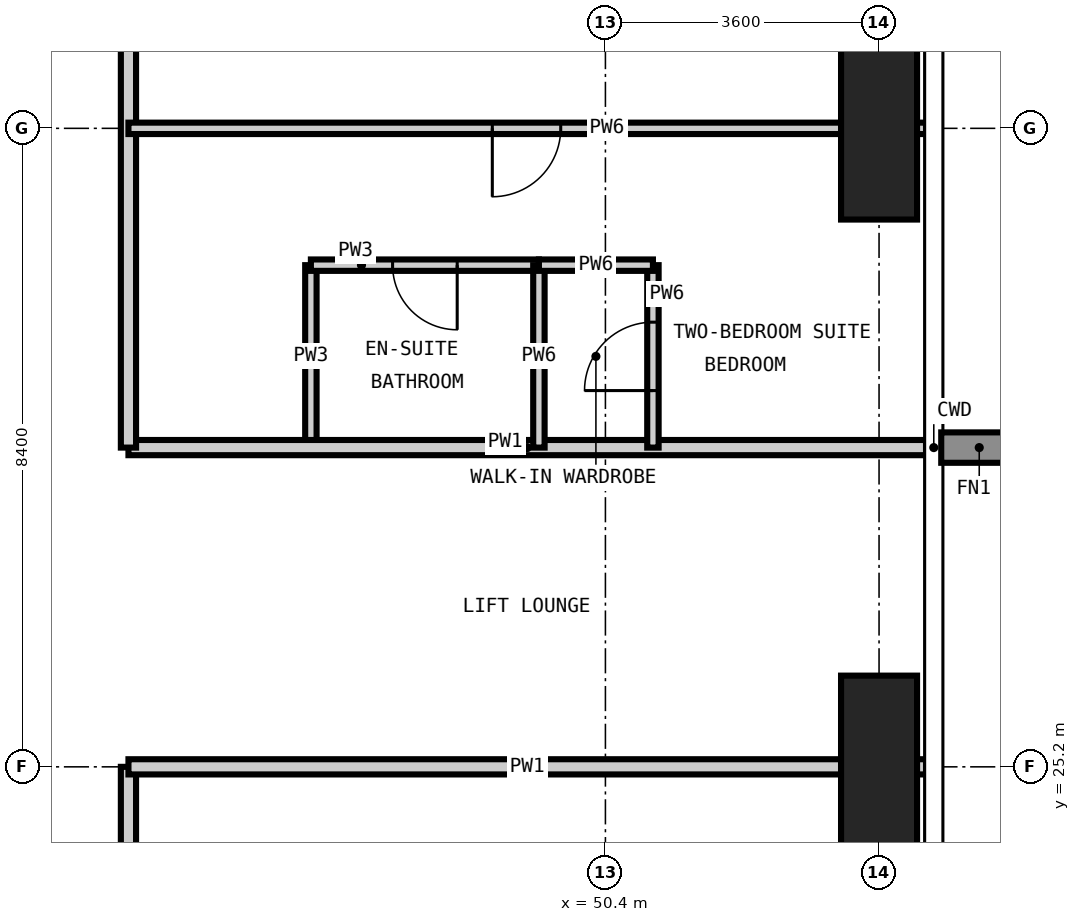
"""IFC4 building model, lengths in metres.
Left out: names, types, materials, properties, quantities, classifications, styles, units other than length and angle.
Written with IfcOpenShell. Run it as: python <this file> out.ifc"""

import sys

from ifc_helpers import new_model, si_unit, direction, frame, frame_2d, origin, origin_2d, place, context, subcontext, project, spatial, rectangle, extrude, element, fill, save


model = new_model("IFC4")
c1 = context("Model", 3, precision=1e-05, world=origin(), true_north=direction((0.0, 1.0)))
c2 = subcontext(c1, "Body", "Model", "MODEL_VIEW")
j1 = project(units=[si_unit("LENGTHUNIT", "METRE"), si_unit("PLANEANGLEUNIT", "RADIAN")], contexts=[c1])
p1 = place(None, origin())
s1 = spatial("IfcSite", under=j1, at=p1, CompositionType="ELEMENT")
p2 = place(p1, origin())
s2 = spatial("IfcBuilding", under=s1, at=p2, CompositionType="ELEMENT")
p3 = place(p2, frame((0.0, 0.0, 276.3)))
s3 = spatial("IfcBuildingStorey", under=s2, at=p3, CompositionType="ELEMENT", Elevation=276.3)
for number, where, z_axis, x_axis in (
    (1, (54.0, 25.2, -0.35), (0.0, 0.0, 1.0), (1.0, 0.0, 0.0)),
    (2, (54.0, 33.6, -0.35), (0.0, 0.0, 1.0), (1.0, 0.0, 0.0)),
):
    element("IfcColumn", number, at=place(p3, frame(where, z_axis=z_axis, x_axis=x_axis)), inside=s3, PredefinedType="COLUMN", context=c2, shape_type="SweptSolid", body=[
        extrude(rectangle(XDim=1.0, YDim=2.4, at=origin_2d()), origin(), (0.0, 0.0, 1.0), 3.9),
    ])
p4 = place(p3, frame((46.525, 29.4, 0.0), z_axis=(0.0, 0.0, 1.0), x_axis=(0.0, 1.0, 0.0)))
e3 = element("IfcWall", 3, at=p4, inside=s3, PredefinedType="PARTITIONING", context=c2, shape_type="SweptSolid", body=[
    extrude(rectangle(XDim=2.4, YDim=0.15, at=frame_2d((1.2, 0.0))), origin(), (0.0, 0.0, 1.0), 3.55),
])
p5 = place(p3, frame((46.525, 31.8, 0.0), z_axis=(0.0, 0.0, 1.0), x_axis=(1.0, 0.0, 0.0)))
e4 = element("IfcWall", 4, at=p5, inside=s3, PredefinedType="PARTITIONING", context=c2, shape_type="SweptSolid", body=[
    extrude(rectangle(XDim=3.0, YDim=0.15, at=frame_2d((1.5, 0.0))), origin(), (0.0, 0.0, 1.0), 3.55),
])
p6 = place(p5, frame((1.075, 0.0, 0.0)))
e5 = element("IfcOpeningElement", 5, at=p6, cuts=e4, PredefinedType="OPENING", context=c2, shape_type="SweptSolid", body=[
    extrude(rectangle(XDim=0.85, YDim=2.1, at=frame_2d((0.425, 1.05))), frame((0.0, 0.085, 0.0), z_axis=(0.0, -1.0, 0.0), x_axis=(1.0, 0.0, 0.0)), (0.0, 0.0, 1.0), 0.17),
])
p7 = place(p3, frame((44.125, 29.4, 0.0), z_axis=(0.0, 0.0, 1.0), x_axis=(1.0, 0.0, 0.0)))
e6 = element("IfcWall", 6, at=p7, inside=s3, PredefinedType="PARTITIONING", context=c2, shape_type="SweptSolid", body=[
    extrude(rectangle(XDim=10.493, YDim=0.2, at=frame_2d((5.247, 0.0))), origin(), (0.0, 0.0, 1.0), 3.55),
])
p8 = place(p3, frame((44.125, 25.2, 0.0), z_axis=(0.0, 0.0, 1.0), x_axis=(0.0, -1.0, 0.0)))
e7 = element("IfcWall", 7, at=p8, inside=s3, PredefinedType="PARTITIONING", context=c2, shape_type="SweptSolid", body=[
    extrude(rectangle(XDim=11.725, YDim=0.2, at=frame_2d((5.862, 0.0))), origin(), (0.0, 0.0, 1.0), 3.55),
])
p9 = place(p8, frame((3.7, 0.0, 0.0)))
e8 = element("IfcOpeningElement", 8, at=p9, cuts=e7, PredefinedType="OPENING", context=c2, shape_type="SweptSolid", body=[
    extrude(rectangle(XDim=1.0, YDim=2.2, at=frame_2d((0.5, 1.1))), frame((0.0, 0.11, 0.0), z_axis=(0.0, -1.0, 0.0), x_axis=(1.0, 0.0, 0.0)), (0.0, 0.0, 1.0), 0.22),
])
p10 = place(p8, frame((9.563, 0.0, 0.0)))
e9 = element("IfcOpeningElement", 9, at=p10, cuts=e7, PredefinedType="OPENING", context=c2, shape_type="SweptSolid", body=[
    extrude(rectangle(XDim=1.0, YDim=2.2, at=frame_2d((0.5, 1.1))), frame((0.0, 0.11, 0.0), z_axis=(0.0, -1.0, 0.0), x_axis=(1.0, 0.0, 0.0)), (0.0, 0.0, 1.0), 0.22),
])
p11 = place(p3, frame((44.125, 44.725, 0.0), z_axis=(0.0, 0.0, 1.0), x_axis=(0.0, -1.0, 0.0)))
e10 = element("IfcWall", 10, at=p11, inside=s3, PredefinedType="PARTITIONING", context=c2, shape_type="SweptSolid", body=[
    extrude(rectangle(XDim=15.325, YDim=0.2, at=frame_2d((7.663, 0.0))), origin(), (0.0, 0.0, 1.0), 3.55),
])
p12 = place(p11, frame((8.525, 0.0, 0.0)))
e11 = element("IfcOpeningElement", 11, at=p12, cuts=e10, PredefinedType="OPENING", context=c2, shape_type="SweptSolid", body=[
    extrude(rectangle(XDim=1.0, YDim=2.2, at=frame_2d((0.5, 1.1))), frame((0.0, 0.11, 0.0), z_axis=(0.0, -1.0, 0.0), x_axis=(1.0, 0.0, 0.0)), (0.0, 0.0, 1.0), 0.22),
])
p13 = place(p11, frame((0.863, 0.0, 0.0)))
e12 = element("IfcOpeningElement", 12, at=p13, cuts=e10, PredefinedType="OPENING", context=c2, shape_type="SweptSolid", body=[
    extrude(rectangle(XDim=1.0, YDim=2.2, at=frame_2d((0.5, 1.1))), frame((0.0, 0.11, 0.0), z_axis=(0.0, -1.0, 0.0), x_axis=(1.0, 0.0, 0.0)), (0.0, 0.0, 1.0), 0.22),
])
p14 = place(p3, frame((54.618, 25.2, 0.0), z_axis=(0.0, 0.0, 1.0), x_axis=(-1.0, 0.0, 0.0)))
e13 = element("IfcWall", 13, at=p14, inside=s3, PredefinedType="PARTITIONING", context=c2, shape_type="SweptSolid", body=[
    extrude(rectangle(XDim=10.493, YDim=0.2, at=frame_2d((5.247, 0.0))), origin(), (0.0, 0.0, 1.0), 3.55),
])
p15 = place(p3, frame((49.525, 29.4, 0.0), z_axis=(0.0, 0.0, 1.0), x_axis=(0.0, 1.0, 0.0)))
e14 = element("IfcWall", 14, at=p15, inside=s3, PredefinedType="PARTITIONING", context=c2, shape_type="SweptSolid", body=[
    extrude(rectangle(XDim=2.4, YDim=0.15, at=frame_2d((1.2, 0.0))), origin(), (0.0, 0.0, 1.0), 3.55),
])
p16 = place(p3, frame((51.025, 29.4, 0.0), z_axis=(0.0, 0.0, 1.0), x_axis=(0.0, 1.0, 0.0)))
e15 = element("IfcWall", 15, at=p16, inside=s3, PredefinedType="PARTITIONING", context=c2, shape_type="SweptSolid", body=[
    extrude(rectangle(XDim=2.4, YDim=0.15, at=frame_2d((1.2, 0.0))), origin(), (0.0, 0.0, 1.0), 3.55),
])
p17 = place(p16, frame((0.75, 0.0, 0.0)))
e16 = element("IfcOpeningElement", 16, at=p17, cuts=e15, PredefinedType="OPENING", context=c2, shape_type="SweptSolid", body=[
    extrude(rectangle(XDim=0.9, YDim=2.1, at=frame_2d((0.45, 1.05))), frame((0.0, 0.085, 0.0), z_axis=(0.0, -1.0, 0.0), x_axis=(1.0, 0.0, 0.0)), (0.0, 0.0, 1.0), 0.17),
])
p18 = place(p3, frame((49.525, 31.8, 0.0), z_axis=(0.0, 0.0, 1.0), x_axis=(1.0, 0.0, 0.0)))
e17 = element("IfcWall", 17, at=p18, inside=s3, PredefinedType="PARTITIONING", context=c2, shape_type="SweptSolid", body=[
    extrude(rectangle(XDim=1.5, YDim=0.15, at=frame_2d((0.75, 0.0))), origin(), (0.0, 0.0, 1.0), 3.55),
])
p19 = place(p3, frame((44.125, 33.6, 0.0), z_axis=(0.0, 0.0, 1.0), x_axis=(1.0, 0.0, 0.0)))
e18 = element("IfcWall", 18, at=p19, inside=s3, PredefinedType="PARTITIONING", context=c2, shape_type="SweptSolid", body=[
    extrude(rectangle(XDim=10.493, YDim=0.15, at=frame_2d((5.247, 0.0))), origin(), (0.0, 0.0, 1.0), 3.55),
])
p20 = place(p19, frame((4.787, 0.0, 0.0)))
e19 = element("IfcOpeningElement", 19, at=p20, cuts=e18, PredefinedType="OPENING", context=c2, shape_type="SweptSolid", body=[
    extrude(rectangle(XDim=0.9, YDim=2.1, at=frame_2d((0.45, 1.05))), frame((0.0, 0.085, 0.0), z_axis=(0.0, -1.0, 0.0), x_axis=(1.0, 0.0, 0.0)), (0.0, 0.0, 1.0), 0.17),
])
p21 = place(p20, frame((0.9, 0.0, 0.0), z_axis=(0.0, 0.0, 1.0), x_axis=(-1.0, 0.0, 0.0)))
e20 = element("IfcDoor", 20, at=p21, inside=s3, OperationType="SINGLE_SWING_RIGHT", PredefinedType="DOOR", context=c2, shape_type="SweptSolid", body=[
    extrude(rectangle(XDim=0.9, YDim=2.1, at=frame_2d((0.45, 1.05))), frame((0.0, 0.025, 0.0), z_axis=(0.0, -1.0, 0.0), x_axis=(1.0, 0.0, 0.0)), (0.0, 0.0, 1.0), 0.05),
])
fill(e19, e20)
p22 = place(p6, frame((0.85, 0.0, 0.0), z_axis=(0.0, 0.0, 1.0), x_axis=(-1.0, 0.0, 0.0)))
e21 = element("IfcDoor", 21, at=p22, inside=s3, OperationType="SINGLE_SWING_LEFT", PredefinedType="DOOR", context=c2, shape_type="SweptSolid", body=[
    extrude(rectangle(XDim=0.85, YDim=2.1, at=frame_2d((0.425, 1.05))), frame((0.0, 0.025, 0.0), z_axis=(0.0, -1.0, 0.0), x_axis=(1.0, 0.0, 0.0)), (0.0, 0.0, 1.0), 0.05),
])
fill(e5, e21)
p23 = place(p17, origin())
e22 = element("IfcDoor", 22, at=p23, inside=s3, OperationType="SINGLE_SWING_LEFT", PredefinedType="DOOR", context=c2, shape_type="SweptSolid", body=[
    extrude(rectangle(XDim=0.9, YDim=2.1, at=frame_2d((0.45, 1.05))), frame((0.0, 0.025, 0.0), z_axis=(0.0, -1.0, 0.0), x_axis=(1.0, 0.0, 0.0)), (0.0, 0.0, 1.0), 0.05),
])
fill(e16, e22)
save(model, sys.argv[1])
